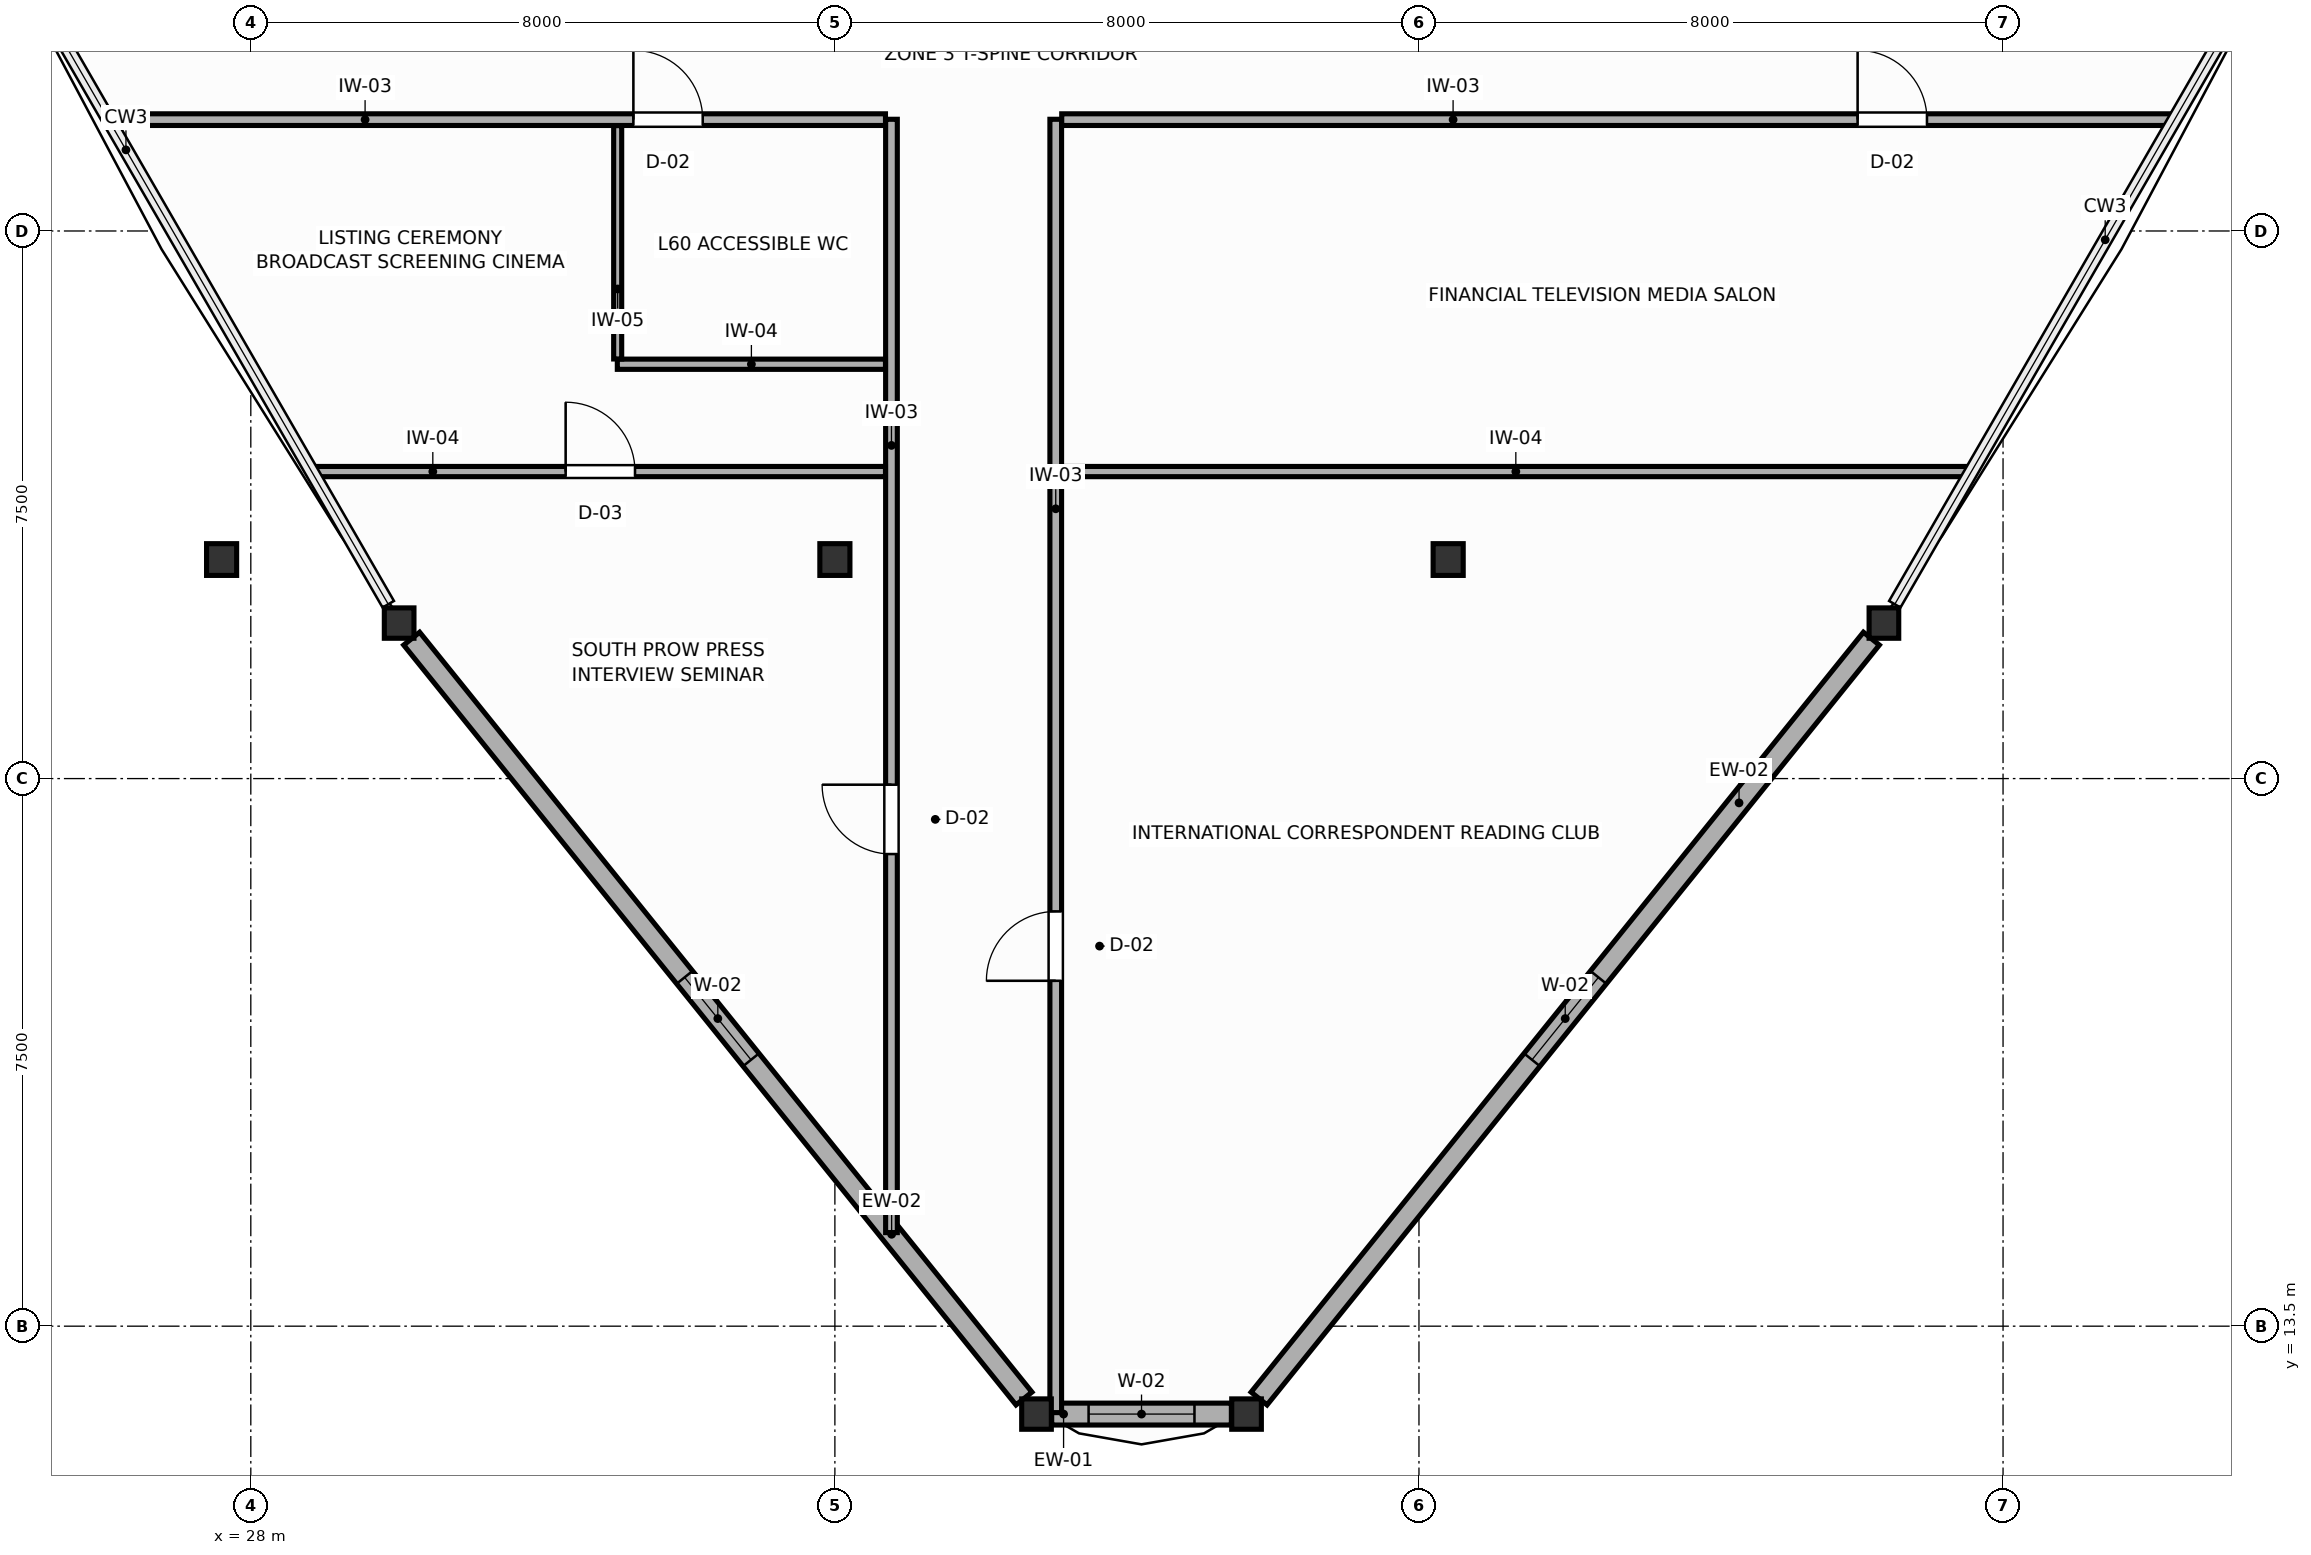
"""IFC4 building model, lengths in metres.
Left out: names, types, materials, properties, quantities, classifications, styles, units other than length and angle.
Written with IfcOpenShell. Run it as: python <this file> out.ifc"""

import sys

from ifc_helpers import new_model, si_unit, direction, frame, frame_2d, origin, origin_2d, place, context, subcontext, project, spatial, rectangle, i_section, extrude, source, transform, mapped, element, fill, save


model = new_model("IFC4")
c1 = context("Model", 3, precision=1e-05, world=origin(), true_north=direction((0.0, 1.0)))
c2 = subcontext(c1, "Body", "Model", "MODEL_VIEW")
j1 = project(units=[si_unit("LENGTHUNIT", "METRE"), si_unit("PLANEANGLEUNIT", "RADIAN")], contexts=[c1])
p1 = place(None, origin())
s1 = spatial("IfcSite", under=j1, at=p1, CompositionType="ELEMENT")
p2 = place(p1, origin())
s2 = spatial("IfcBuilding", under=s1, at=p2, CompositionType="ELEMENT")
p3 = place(p2, frame((0.0, 0.0, 231.0)))
s3 = spatial("IfcBuildingStorey", under=s2, at=p3, CompositionType="ELEMENT", Elevation=231.0)
m1 = source(origin(), c2, "Body", "SweptSolid", [
    extrude(i_section(OverallWidth=0.412, OverallDepth=0.435, WebThickness=0.033, FlangeThickness=0.053, FilletRadius=0.015, at=origin_2d()), origin(), (0.0, 0.0, 1.0), 3.6),
])
for number, where, z_axis, x_axis in (
    (1, (27.6, 24.0, 0.0), (0.0, 0.0, 1.0), (1.0, 0.0, 0.0)),
    (2, (44.4, 24.0, 0.0), (0.0, 0.0, 1.0), (1.0, 0.0, 0.0)),
    (3, (36.0, 24.0, 0.0), (0.0, 0.0, 1.0), (1.0, 0.0, 0.0)),
):
    element("IfcColumn", number, at=place(p3, frame(where, z_axis=z_axis, x_axis=x_axis)), inside=s3, PredefinedType="COLUMN", context=c2, shape_type="MappedRepresentation", body=[
        mapped(m1, transform((0.0, 0.0, 0.0), scale=1.0)),
    ])
m2 = source(origin(), c2, "Body", "SweptSolid", [
    extrude(i_section(OverallWidth=0.406, OverallDepth=0.416, WebThickness=0.027, FlangeThickness=0.044, FilletRadius=0.015, at=origin_2d()), origin(), (0.0, 0.0, 1.0), 3.6),
])
for number, where, z_axis, x_axis in (
    (4, (30.032, 23.13, 0.0), (0.0, 0.0, 1.0), (1.0, 0.0, 0.0)),
    (5, (38.762, 12.296, 0.0), (0.0, 0.0, 1.0), (1.0, 0.0, 0.0)),
    (6, (41.638, 12.296, 0.0), (0.0, 0.0, 1.0), (1.0, 0.0, 0.0)),
    (7, (50.368, 23.13, 0.0), (0.0, 0.0, 1.0), (1.0, 0.0, 0.0)),
):
    element("IfcColumn", number, at=place(p3, frame(where, z_axis=z_axis, x_axis=x_axis)), inside=s3, PredefinedType="COLUMN", context=c2, shape_type="MappedRepresentation", body=[
        mapped(m2, transform((0.0, 0.0, 0.0), scale=1.0)),
    ])
p4 = place(p3, frame((30.203, 22.917, 0.0), z_axis=(0.0, 0.0, 1.0), x_axis=(0.627453225305, -0.778654255786, 0.0)))
e8 = element("IfcWall", 8, at=p4, inside=s3, PredefinedType="SOLIDWALL", context=c2, shape_type="SweptSolid", body=[
    extrude(rectangle(XDim=13.366, YDim=0.28, at=frame_2d((6.683, 0.0))), origin(), (0.0, 0.0, 1.0), 2.96),
])
p5 = place(p4, frame((5.958, 0.0, 0.75)))
e9 = element("IfcOpeningElement", 9, at=p5, cuts=e8, PredefinedType="OPENING", context=c2, shape_type="SweptSolid", body=[
    extrude(rectangle(XDim=1.45, YDim=1.65, at=frame_2d((0.725, 0.825))), frame((0.0, 0.15, 0.0), z_axis=(0.0, -1.0, 0.0), x_axis=(1.0, 0.0, 0.0)), (0.0, 0.0, 1.0), 0.3),
])
p6 = place(p3, frame((38.969, 12.296, 0.0), z_axis=(0.0, 0.0, 1.0), x_axis=(1.0, 0.0, 0.0)))
e10 = element("IfcWall", 10, at=p6, inside=s3, PredefinedType="SOLIDWALL", context=c2, shape_type="SweptSolid", body=[
    extrude(rectangle(XDim=2.461, YDim=0.3, at=frame_2d((1.23, 0.0))), origin(), (0.0, 0.0, 1.0), 3.02),
])
p7 = place(p6, frame((0.505, 0.0, 0.75)))
e11 = element("IfcOpeningElement", 11, at=p7, cuts=e10, PredefinedType="OPENING", context=c2, shape_type="SweptSolid", body=[
    extrude(rectangle(XDim=1.45, YDim=1.65, at=frame_2d((0.725, 0.825))), frame((0.0, 0.16, 0.0), z_axis=(0.0, -1.0, 0.0), x_axis=(1.0, 0.0, 0.0)), (0.0, 0.0, 1.0), 0.32),
])
p8 = place(p3, frame((41.81, 12.509, 0.0), z_axis=(0.0, 0.0, 1.0), x_axis=(0.627453225305, 0.778654255786, 0.0)))
e12 = element("IfcWall", 12, at=p8, inside=s3, PredefinedType="SOLIDWALL", context=c2, shape_type="SweptSolid", body=[
    extrude(rectangle(XDim=13.366, YDim=0.28, at=frame_2d((6.683, 0.0))), origin(), (0.0, 0.0, 1.0), 2.96),
])
p9 = place(p8, frame((5.958, 0.0, 0.75)))
e13 = element("IfcOpeningElement", 13, at=p9, cuts=e12, PredefinedType="OPENING", context=c2, shape_type="SweptSolid", body=[
    extrude(rectangle(XDim=1.45, YDim=1.65, at=frame_2d((0.725, 0.825))), frame((0.0, 0.15, 0.0), z_axis=(0.0, -1.0, 0.0), x_axis=(1.0, 0.0, 0.0)), (0.0, 0.0, 1.0), 0.3),
])
p10 = place(p3, frame((39.025, 12.316, 0.0), z_axis=(0.0, 0.0, 1.0), x_axis=(0.0, 1.0, 0.0)))
e14 = element("IfcWall", 14, at=p10, inside=s3, PredefinedType="PARTITIONING", context=c2, shape_type="SweptSolid", body=[
    extrude(rectangle(XDim=17.714, YDim=0.16, at=frame_2d((8.857, 0.0))), origin(), (0.0, 0.0, 1.0), 3.41),
])
p11 = place(p10, frame((5.914, 0.0, 0.0)))
e15 = element("IfcOpeningElement", 15, at=p11, cuts=e14, PredefinedType="OPENING", context=c2, shape_type="SweptSolid", body=[
    extrude(rectangle(XDim=0.95, YDim=2.05, at=frame_2d((0.475, 1.025))), frame((0.0, 0.09, 0.0), z_axis=(0.0, -1.0, 0.0), x_axis=(1.0, 0.0, 0.0)), (0.0, 0.0, 1.0), 0.18),
])
p12 = place(p3, frame((39.107, 30.025, 0.0), z_axis=(0.0, 0.0, 1.0), x_axis=(1.0, 0.0, 0.0)))
e16 = element("IfcWall", 16, at=p12, inside=s3, PredefinedType="PARTITIONING", context=c2, shape_type="SweptSolid", body=[
    extrude(rectangle(XDim=15.222, YDim=0.16, at=frame_2d((7.611, 0.0))), origin(), (0.0, 0.0, 1.0), 3.41),
])
p13 = place(p12, frame((10.901, 0.0, 0.0)))
e17 = element("IfcOpeningElement", 17, at=p13, cuts=e16, PredefinedType="OPENING", context=c2, shape_type="SweptSolid", body=[
    extrude(rectangle(XDim=0.95, YDim=2.05, at=frame_2d((0.475, 1.025))), frame((0.0, 0.09, 0.0), z_axis=(0.0, -1.0, 0.0), x_axis=(1.0, 0.0, 0.0)), (0.0, 0.0, 1.0), 0.18),
])
p14 = place(p3, frame((36.775, 14.781, 0.0), z_axis=(0.0, 0.0, 1.0), x_axis=(0.0, 1.0, 0.0)))
e18 = element("IfcWall", 18, at=p14, inside=s3, PredefinedType="PARTITIONING", context=c2, shape_type="SweptSolid", body=[
    extrude(rectangle(XDim=15.249, YDim=0.16, at=frame_2d((7.624, 0.0))), origin(), (0.0, 0.0, 1.0), 2.96),
])
p15 = place(p14, frame((5.185, 0.0, 0.0)))
e19 = element("IfcOpeningElement", 19, at=p15, cuts=e18, PredefinedType="OPENING", context=c2, shape_type="SweptSolid", body=[
    extrude(rectangle(XDim=0.95, YDim=2.05, at=frame_2d((0.475, 1.025))), frame((0.0, 0.09, 0.0), z_axis=(0.0, -1.0, 0.0), x_axis=(1.0, 0.0, 0.0)), (0.0, 0.0, 1.0), 0.18),
])
p16 = place(p3, frame((26.071, 30.025, 0.0), z_axis=(0.0, 0.0, 1.0), x_axis=(1.0, 0.0, 0.0)))
e20 = element("IfcWall", 20, at=p16, inside=s3, PredefinedType="PARTITIONING", context=c2, shape_type="SweptSolid", body=[
    extrude(rectangle(XDim=10.622, YDim=0.16, at=frame_2d((5.311, 0.0))), origin(), (0.0, 0.0, 1.0), 3.41),
])
p17 = place(p16, frame((7.169, 0.0, 0.0)))
e21 = element("IfcOpeningElement", 21, at=p17, cuts=e20, PredefinedType="OPENING", context=c2, shape_type="SweptSolid", body=[
    extrude(rectangle(XDim=0.95, YDim=2.05, at=frame_2d((0.475, 1.025))), frame((0.0, 0.09, 0.0), z_axis=(0.0, -1.0, 0.0), x_axis=(1.0, 0.0, 0.0)), (0.0, 0.0, 1.0), 0.18),
])
p18 = place(p3, frame((39.107, 25.205, 0.0), z_axis=(0.0, 0.0, 1.0), x_axis=(1.0, 0.0, 0.0)))
e22 = element("IfcWall", 22, at=p18, inside=s3, PredefinedType="PARTITIONING", context=c2, shape_type="SweptSolid", body=[
    extrude(rectangle(XDim=12.439, YDim=0.14, at=frame_2d((6.22, 0.0))), origin(), (0.0, 0.0, 1.0), 3.41),
])
p19 = place(p3, frame((28.854, 25.205, 0.0), z_axis=(0.0, 0.0, 1.0), x_axis=(1.0, 0.0, 0.0)))
e23 = element("IfcWall", 23, at=p19, inside=s3, PredefinedType="PARTITIONING", context=c2, shape_type="SweptSolid", body=[
    extrude(rectangle(XDim=7.84, YDim=0.14, at=frame_2d((3.92, 0.0))), origin(), (0.0, 0.0, 1.0), 3.41),
])
p20 = place(p19, frame((3.459, 0.0, 0.0)))
e24 = element("IfcOpeningElement", 24, at=p20, cuts=e23, PredefinedType="OPENING", context=c2, shape_type="SweptSolid", body=[
    extrude(rectangle(XDim=0.95, YDim=2.05, at=frame_2d((0.475, 1.025))), frame((0.0, 0.08, 0.0), z_axis=(0.0, -1.0, 0.0), x_axis=(1.0, 0.0, 0.0)), (0.0, 0.0, 1.0), 0.16),
])
p21 = place(p3, frame((33.02, 26.675, 0.0), z_axis=(0.0, 0.0, 1.0), x_axis=(1.0, 0.0, 0.0)))
e25 = element("IfcWall", 25, at=p21, inside=s3, PredefinedType="PARTITIONING", context=c2, shape_type="SweptSolid", body=[
    extrude(rectangle(XDim=3.673, YDim=0.14, at=frame_2d((1.836, 0.0))), origin(), (0.0, 0.0, 1.0), 3.41),
])
p22 = place(p3, frame((33.025, 26.747, 0.0), z_axis=(0.0, 0.0, 1.0), x_axis=(0.0, 1.0, 0.0)))
e26 = element("IfcWall", 26, at=p22, inside=s3, PredefinedType="MOVABLE", context=c2, shape_type="SweptSolid", body=[
    extrude(rectangle(XDim=3.196, YDim=0.11, at=frame_2d((1.598, 0.0))), origin(), (0.0, 0.0, 1.0), 3.41),
])
p23 = place(p5, origin())
e27 = element("IfcWindow", 27, at=p23, inside=s3, PartitioningType="SINGLE_PANEL", PredefinedType="WINDOW", context=c2, shape_type="SweptSolid", body=[
    extrude(rectangle(XDim=1.45, YDim=1.65, at=frame_2d((0.725, 0.825))), frame((0.0, 0.03, 0.0), z_axis=(0.0, -1.0, 0.0), x_axis=(1.0, 0.0, 0.0)), (0.0, 0.0, 1.0), 0.06),
])
fill(e9, e27)
p24 = place(p7, origin())
e28 = element("IfcWindow", 28, at=p24, inside=s3, PartitioningType="SINGLE_PANEL", PredefinedType="WINDOW", context=c2, shape_type="SweptSolid", body=[
    extrude(rectangle(XDim=1.45, YDim=1.65, at=frame_2d((0.725, 0.825))), frame((0.0, 0.03, 0.0), z_axis=(0.0, -1.0, 0.0), x_axis=(1.0, 0.0, 0.0)), (0.0, 0.0, 1.0), 0.06),
])
fill(e11, e28)
p25 = place(p9, origin())
e29 = element("IfcWindow", 29, at=p25, inside=s3, PartitioningType="SINGLE_PANEL", PredefinedType="WINDOW", context=c2, shape_type="SweptSolid", body=[
    extrude(rectangle(XDim=1.45, YDim=1.65, at=frame_2d((0.725, 0.825))), frame((0.0, 0.03, 0.0), z_axis=(0.0, -1.0, 0.0), x_axis=(1.0, 0.0, 0.0)), (0.0, 0.0, 1.0), 0.06),
])
fill(e13, e29)
p26 = place(p11, origin())
e30 = element("IfcDoor", 30, at=p26, inside=s3, OperationType="SINGLE_SWING_LEFT", PredefinedType="DOOR", context=c2, shape_type="SweptSolid", body=[
    extrude(rectangle(XDim=0.95, YDim=2.05, at=frame_2d((0.475, 1.025))), frame((0.0, 0.025, 0.0), z_axis=(0.0, -1.0, 0.0), x_axis=(1.0, 0.0, 0.0)), (0.0, 0.0, 1.0), 0.05),
])
fill(e15, e30)
p27 = place(p13, origin())
e31 = element("IfcDoor", 31, at=p27, inside=s3, OperationType="SINGLE_SWING_LEFT", PredefinedType="DOOR", context=c2, shape_type="SweptSolid", body=[
    extrude(rectangle(XDim=0.95, YDim=2.05, at=frame_2d((0.475, 1.025))), frame((0.0, 0.025, 0.0), z_axis=(0.0, -1.0, 0.0), x_axis=(1.0, 0.0, 0.0)), (0.0, 0.0, 1.0), 0.05),
])
fill(e17, e31)
p28 = place(p15, origin())
e32 = element("IfcDoor", 32, at=p28, inside=s3, OperationType="SINGLE_SWING_RIGHT", PredefinedType="DOOR", context=c2, shape_type="SweptSolid", body=[
    extrude(rectangle(XDim=0.95, YDim=2.05, at=frame_2d((0.475, 1.025))), frame((0.0, 0.025, 0.0), z_axis=(0.0, -1.0, 0.0), x_axis=(1.0, 0.0, 0.0)), (0.0, 0.0, 1.0), 0.05),
])
fill(e19, e32)
p29 = place(p17, origin())
e33 = element("IfcDoor", 33, at=p29, inside=s3, OperationType="SINGLE_SWING_LEFT", PredefinedType="DOOR", context=c2, shape_type="SweptSolid", body=[
    extrude(rectangle(XDim=0.95, YDim=2.05, at=frame_2d((0.475, 1.025))), frame((0.0, 0.025, 0.0), z_axis=(0.0, -1.0, 0.0), x_axis=(1.0, 0.0, 0.0)), (0.0, 0.0, 1.0), 0.05),
])
fill(e21, e33)
p30 = place(p20, origin())
e34 = element("IfcDoor", 34, at=p30, inside=s3, OperationType="SINGLE_SWING_LEFT", PredefinedType="DOOR", context=c2, shape_type="SweptSolid", body=[
    extrude(rectangle(XDim=0.95, YDim=2.05, at=frame_2d((0.475, 1.025))), frame((0.0, 0.025, 0.0), z_axis=(0.0, -1.0, 0.0), x_axis=(1.0, 0.0, 0.0)), (0.0, 0.0, 1.0), 0.05),
])
fill(e24, e34)
save(model, sys.argv[1])
